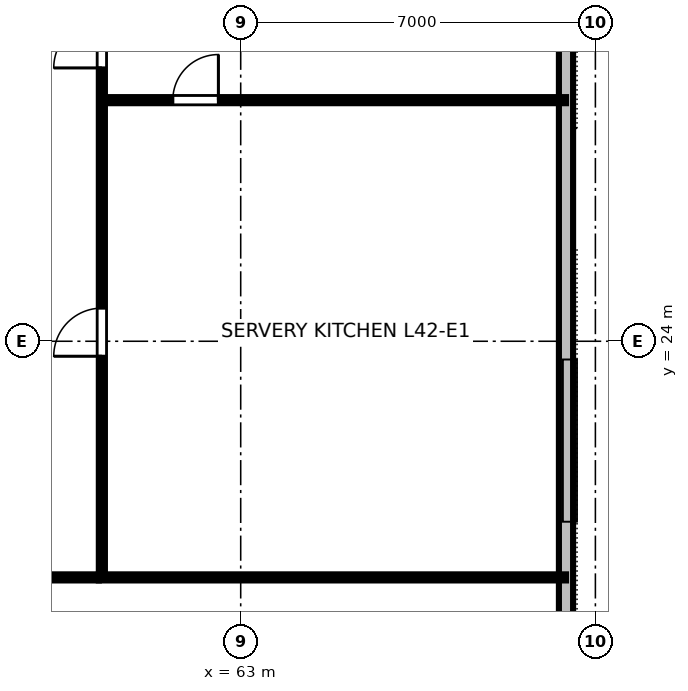
"""IFC4 building model, lengths in metres.
Left out: names, types, materials, properties, quantities, classifications, styles, units other than length and angle.
Written with IfcOpenShell. Run it as: python <this file> out.ifc"""

import sys

from ifc_helpers import new_model, si_unit, direction, frame, frame_2d, origin, place, context, subcontext, project, spatial, rectangle, extrude, element, fill, save


model = new_model("IFC4")
c1 = context("Model", 3, precision=1e-05, world=origin(), true_north=direction((0.0, 1.0)))
c2 = subcontext(c1, "Body", "Model", "MODEL_VIEW")
j1 = project(units=[si_unit("LENGTHUNIT", "METRE"), si_unit("PLANEANGLEUNIT", "RADIAN")], contexts=[c1])
p1 = place(None, origin())
s1 = spatial("IfcSite", under=j1, at=p1, CompositionType="ELEMENT")
p2 = place(p1, origin())
s2 = spatial("IfcBuilding", under=s1, at=p2, CompositionType="ELEMENT")
p3 = place(p2, frame((0.0, 0.0, 160.0)))
s3 = spatial("IfcBuildingStorey", under=s2, at=p3, CompositionType="ELEMENT", Elevation=160.0)
p4 = place(p3, frame((69.42, 16.16, 0.0), z_axis=(0.0, 0.0, 1.0), x_axis=(0.0, 1.0, 0.0)))
e1 = element("IfcWall", 1, at=p4, inside=s3, PredefinedType="STANDARD", context=c2, shape_type="SweptSolid", body=[
    extrude(rectangle(XDim=31.68, YDim=0.28, at=frame_2d((15.84, 0.0))), origin(), (0.0, 0.0, 1.0), 3.36),
])
p5 = place(p3, frame((31.8, 19.34, 0.0), z_axis=(0.0, 0.0, 1.0), x_axis=(1.0, 0.0, 0.0)))
e2 = element("IfcWall", 2, at=p5, inside=s3, PredefinedType="PARTITIONING", context=c2, shape_type="SweptSolid", body=[
    extrude(rectangle(XDim=28.4, YDim=0.12, at=frame_2d((14.2, 0.0))), origin(), (0.0, 0.0, 1.0), 2.64),
])
p6 = place(p5, frame((13.725, 0.0, 0.0)))
e3 = element("IfcOpeningElement", 3, at=p6, cuts=e2, PredefinedType="OPENING", context=c2, shape_type="SweptSolid", body=[
    extrude(rectangle(XDim=0.95, YDim=2.15, at=frame_2d((0.475, 1.075))), frame((0.0, 0.07, 0.0), z_axis=(0.0, -1.0, 0.0), x_axis=(1.0, 0.0, 0.0)), (0.0, 0.0, 1.0), 0.14),
])
p7 = place(p3, frame((60.26, 28.758, 0.0), z_axis=(0.0, 0.0, 1.0), x_axis=(1.0, 0.0, 0.0)))
e4 = element("IfcWall", 4, at=p7, inside=s3, PredefinedType="PARTITIONING", context=c2, shape_type="SweptSolid", body=[
    extrude(rectangle(XDim=9.16, YDim=0.12, at=frame_2d((4.58, 0.0))), origin(), (0.0, 0.0, 1.0), 2.64),
])
p8 = place(p7, frame((1.4, 0.0, 0.0)))
e5 = element("IfcOpeningElement", 5, at=p8, cuts=e4, PredefinedType="OPENING", context=c2, shape_type="SweptSolid", body=[
    extrude(rectangle(XDim=0.9, YDim=2.15, at=frame_2d((0.45, 1.075))), frame((0.0, 0.07, 0.0), z_axis=(0.0, -1.0, 0.0), x_axis=(1.0, 0.0, 0.0)), (0.0, 0.0, 1.0), 0.14),
])
p9 = place(p3, frame((60.26, 19.4, 0.0), z_axis=(0.0, 0.0, 1.0), x_axis=(0.0, 1.0, 0.0)))
e6 = element("IfcWall", 6, at=p9, inside=s3, PredefinedType="PARTITIONING", context=c2, shape_type="SweptSolid", body=[
    extrude(rectangle(XDim=11.58, YDim=0.12, at=frame_2d((5.79, 0.0))), origin(), (0.0, 0.0, 1.0), 2.64),
])
p10 = place(p9, frame((4.304, 0.0, 0.0)))
e7 = element("IfcOpeningElement", 7, at=p10, cuts=e6, PredefinedType="OPENING", context=c2, shape_type="SweptSolid", body=[
    extrude(rectangle(XDim=0.95, YDim=2.15, at=frame_2d((0.475, 1.075))), frame((0.0, 0.07, 0.0), z_axis=(0.0, -1.0, 0.0), x_axis=(1.0, 0.0, 0.0)), (0.0, 0.0, 1.0), 0.14),
])
p11 = place(p9, frame((9.994, 0.0, 0.0)))
e8 = element("IfcOpeningElement", 8, at=p11, cuts=e6, PredefinedType="OPENING", context=c2, shape_type="SweptSolid", body=[
    extrude(rectangle(XDim=0.95, YDim=2.15, at=frame_2d((0.475, 1.075))), frame((0.0, 0.07, 0.0), z_axis=(0.0, -1.0, 0.0), x_axis=(1.0, 0.0, 0.0)), (0.0, 0.0, 1.0), 0.14),
])
p12 = place(p3, frame((60.2, 19.34, 0.0), z_axis=(0.0, 0.0, 1.0), x_axis=(1.0, 0.0, 0.0)))
e9 = element("IfcWall", 9, at=p12, inside=s3, PredefinedType="PARTITIONING", context=c2, shape_type="SweptSolid", body=[
    extrude(rectangle(XDim=9.22, YDim=0.12, at=frame_2d((4.61, 0.0))), origin(), (0.0, 0.0, 1.0), 2.64),
])
p13 = place(p8, origin())
e10 = element("IfcDoor", 10, at=p13, inside=s3, OperationType="SINGLE_SWING_RIGHT", PredefinedType="DOOR", context=c2, shape_type="SweptSolid", body=[
    extrude(rectangle(XDim=0.9, YDim=2.15, at=frame_2d((0.45, 1.075))), frame((0.0, 0.025, 0.0), z_axis=(0.0, -1.0, 0.0), x_axis=(1.0, 0.0, 0.0)), (0.0, 0.0, 1.0), 0.05),
])
fill(e5, e10)
p14 = place(p10, origin())
e11 = element("IfcDoor", 11, at=p14, inside=s3, OperationType="SINGLE_SWING_LEFT", PredefinedType="DOOR", context=c2, shape_type="SweptSolid", body=[
    extrude(rectangle(XDim=0.95, YDim=2.15, at=frame_2d((0.475, 1.075))), frame((0.0, 0.025, 0.0), z_axis=(0.0, -1.0, 0.0), x_axis=(1.0, 0.0, 0.0)), (0.0, 0.0, 1.0), 0.05),
])
fill(e7, e11)
p15 = place(p11, origin())
e12 = element("IfcDoor", 12, at=p15, inside=s3, OperationType="SINGLE_SWING_LEFT", PredefinedType="DOOR", context=c2, shape_type="SweptSolid", body=[
    extrude(rectangle(XDim=0.95, YDim=2.15, at=frame_2d((0.475, 1.075))), frame((0.0, 0.025, 0.0), z_axis=(0.0, -1.0, 0.0), x_axis=(1.0, 0.0, 0.0)), (0.0, 0.0, 1.0), 0.05),
])
fill(e8, e12)
save(model, sys.argv[1])
